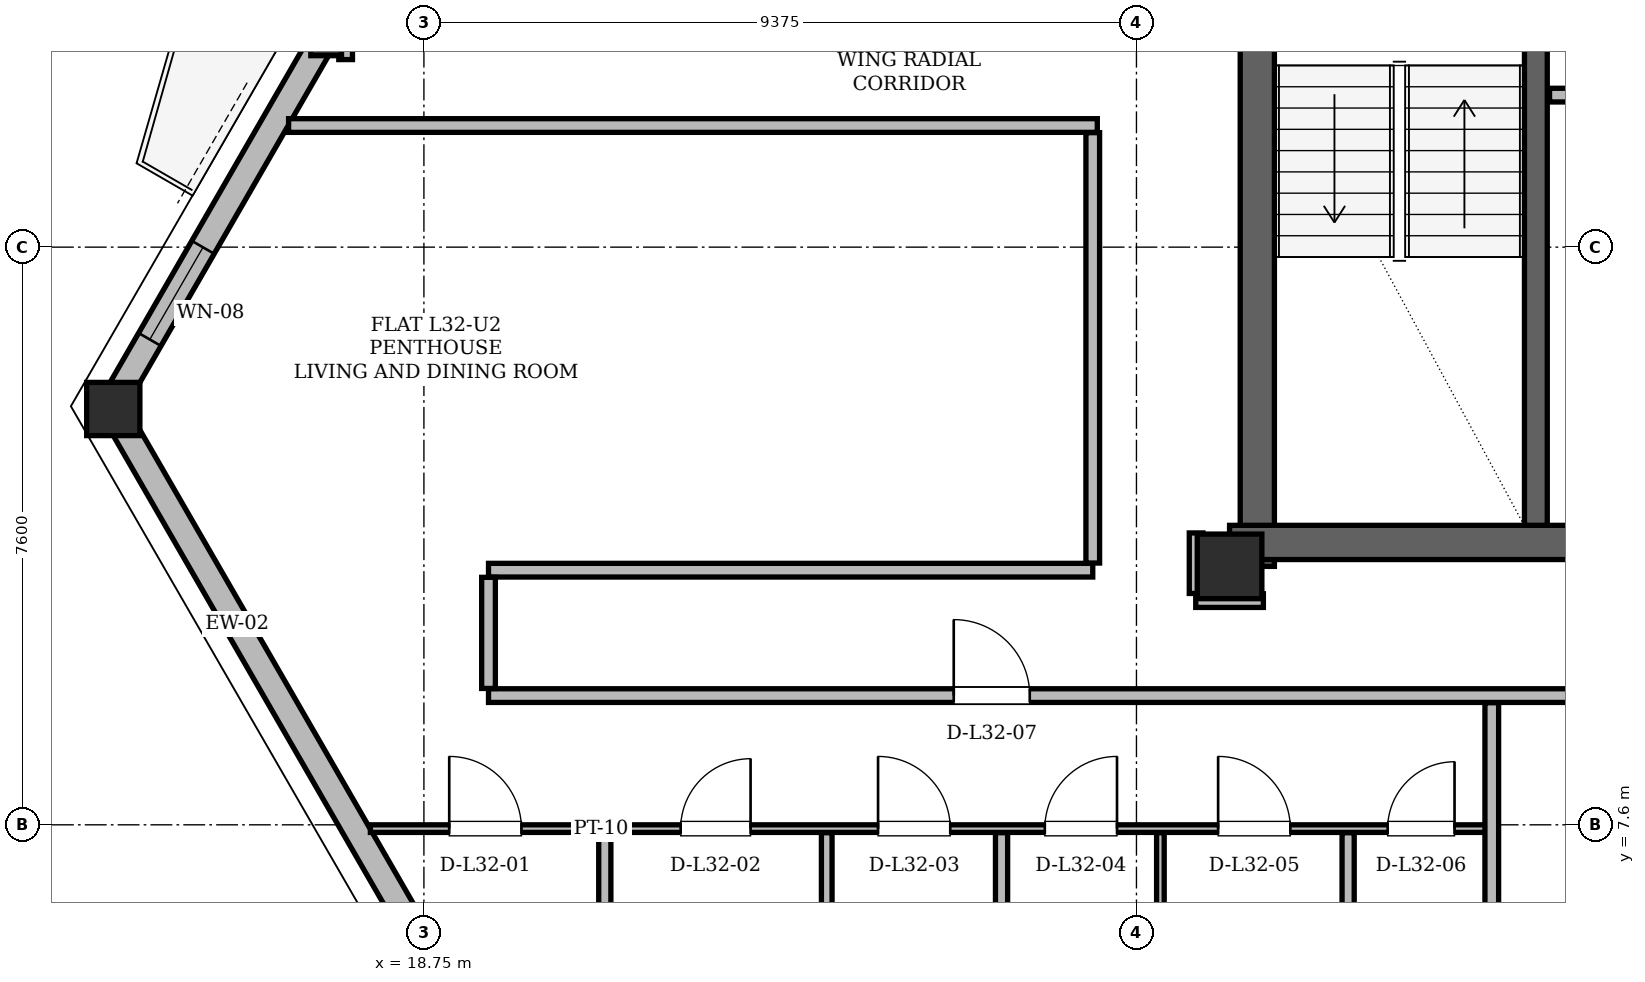
"""IFC4 building model, lengths in metres.
Left out: names, types, materials, properties, quantities, classifications, styles, units other than length and angle.
Written with IfcOpenShell. Run it as: python <this file> out.ifc"""

import sys

from ifc_helpers import new_model, si_unit, direction, frame, frame_2d, origin, origin_2d, place, context, subcontext, project, spatial, rectangle, hollow_rectangle, i_section, extrude, element, fill, save


model = new_model("IFC4")
c1 = context("Model", 3, precision=1e-05, world=origin(), true_north=direction((0.0, 1.0)))
c2 = subcontext(c1, "Body", "Model", "MODEL_VIEW")
j1 = project(units=[si_unit("LENGTHUNIT", "METRE"), si_unit("PLANEANGLEUNIT", "RADIAN")], contexts=[c1])
p1 = place(None, origin())
s1 = spatial("IfcSite", under=j1, at=p1, CompositionType="ELEMENT")
p2 = place(p1, origin())
s2 = spatial("IfcBuilding", under=s1, at=p2, CompositionType="ELEMENT")
p3 = place(p2, frame((0.0, 0.0, 123.0)))
s3 = spatial("IfcBuildingStorey", under=s2, at=p3, CompositionType="ELEMENT", Elevation=123.0)
p4 = place(p3, frame((29.35, 11.0, 0.0), z_axis=(0.0, 0.0, 1.0), x_axis=(1.0, 0.0, 0.0)))
e1 = element("IfcColumn", 1, at=p4, inside=s3, PredefinedType="COLUMN", context=c2, shape_type="SweptSolid", body=[
    extrude(hollow_rectangle(XDim=0.85, YDim=0.85, WallThickness=0.07, at=origin_2d()), origin(), (0.0, 0.0, 1.0), 3.6),
])
p5 = place(p3, frame((14.636, 13.107, 0.004), z_axis=(0.014748241412, -0.020253345349, 0.999686096421), x_axis=(0.808384021956, 0.588655479076, 0.0)))
e2 = element("IfcColumn", 2, at=p5, inside=s3, PredefinedType="COLUMN", context=c2, shape_type="SweptSolid", body=[
    extrude(hollow_rectangle(XDim=0.7, YDim=0.7, WallThickness=0.055, at=origin_2d()), origin(), (0.0, 0.0, 1.0), 3.592),
])
p6 = place(p3, frame((17.435, 17.953, 0.004), z_axis=(0.016379828323, -0.017467285805, 0.999713256464), x_axis=(0.729448684879, 0.684035537182, 0.0)))
e3 = element("IfcColumn", 3, at=p6, inside=s3, PredefinedType="COLUMN", context=c2, shape_type="SweptSolid", body=[
    extrude(i_section(OverallWidth=0.404, OverallDepth=0.406, WebThickness=0.027, FlangeThickness=0.044, at=origin_2d()), origin(), (0.0, 0.0, 1.0), 3.592),
])
p7 = place(p3, frame((29.715, 11.0, 0.0), z_axis=(0.0, 0.0, 1.0), x_axis=(0.0, 1.0, 0.0)))
e4 = element("IfcWall", 4, at=p7, inside=s3, PredefinedType="SHEAR", context=c2, shape_type="SweptSolid", body=[
    extrude(rectangle(XDim=13.3, YDim=0.45, at=frame_2d((6.65, 0.0))), origin(), (0.0, 0.0, 1.0), 3.36),
])
p8 = place(p3, frame((29.35, 11.315, 0.0), z_axis=(0.0, 0.0, 1.0), x_axis=(1.0, 0.0, 0.0)))
e5 = element("IfcWall", 5, at=p8, inside=s3, PredefinedType="SHEAR", context=c2, shape_type="SweptSolid", body=[
    extrude(rectangle(XDim=7.1, YDim=0.45, at=frame_2d((3.55, 0.0))), origin(), (0.0, 0.0, 1.0), 3.36),
])
p9 = place(p3, frame((33.38, 11.54, 0.0), z_axis=(0.0, 0.0, 1.0), x_axis=(0.0, 1.0, 0.0)))
e6 = element("IfcWall", 6, at=p9, inside=s3, PredefinedType="SHEAR", context=c2, shape_type="SweptSolid", body=[
    extrude(rectangle(XDim=7.62, YDim=0.3, at=frame_2d((3.81, 0.0))), origin(), (0.0, 0.0, 1.0), 3.36),
])
p10 = place(p3, frame((14.636, 13.107, 0.0), z_axis=(0.0, 0.0, 1.0), x_axis=(0.500010095722, -0.866019574938, 0.0)))
e7 = element("IfcWall", 7, at=p10, inside=s3, PredefinedType="SOLIDWALL", context=c2, shape_type="SweptSolid", body=[
    extrude(rectangle(XDim=10.751, YDim=0.34, at=frame_2d((5.375, 0.0))), origin(), (0.0, 0.0, 1.0), 2.578),
])
p11 = place(p3, frame((32.124, 43.397, 0.0), z_axis=(0.0, 0.0, 1.0), x_axis=(-0.499996370967, -0.866027498997, 0.0)))
e8 = element("IfcWall", 8, at=p11, inside=s3, PredefinedType="SOLIDWALL", context=c2, shape_type="SweptSolid", body=[
    extrude(rectangle(XDim=34.976, YDim=0.34, at=frame_2d((17.488, 0.0))), origin(), (0.0, 0.0, 1.0), 2.578),
])
p12 = place(p11, frame((8.034, 0.0, 0.0)))
e9 = element("IfcOpeningElement", 9, at=p12, cuts=e8, PredefinedType="OPENING", context=c2, shape_type="SweptSolid", body=[
    extrude(rectangle(XDim=1.5, YDim=2.2, at=frame_2d((0.75, 1.1))), frame((0.0, 0.17, 0.0), z_axis=(0.0, -1.0, 0.0), x_axis=(1.0, 0.0, 0.0)), (0.0, 0.0, 1.0), 0.34),
])
p13 = place(p11, frame((26.896, 0.0, 0.0)))
e10 = element("IfcOpeningElement", 10, at=p13, cuts=e8, PredefinedType="OPENING", context=c2, shape_type="SweptSolid", body=[
    extrude(rectangle(XDim=1.5, YDim=2.2, at=frame_2d((0.75, 1.1))), frame((0.0, 0.17, 0.0), z_axis=(0.0, -1.0, 0.0), x_axis=(1.0, 0.0, 0.0)), (0.0, 0.0, 1.0), 0.34),
])
p14 = place(p11, frame((32.562, 0.0, 0.85)))
e11 = element("IfcOpeningElement", 11, at=p14, cuts=e8, PredefinedType="OPENING", context=c2, shape_type="SweptSolid", body=[
    extrude(rectangle(XDim=1.4, YDim=1.6, at=frame_2d((0.7, 0.8))), frame((0.0, 0.17, 0.0), z_axis=(0.0, -1.0, 0.0), x_axis=(1.0, 0.0, 0.0)), (0.0, 0.0, 1.0), 0.34),
])
p15 = place(p11, frame((22.614, 0.0, 0.85)))
e12 = element("IfcOpeningElement", 12, at=p15, cuts=e8, PredefinedType="OPENING", context=c2, shape_type="SweptSolid", body=[
    extrude(rectangle(XDim=1.2, YDim=1.48, at=frame_2d((0.6, 0.74))), frame((0.0, 0.17, 0.0), z_axis=(0.0, -1.0, 0.0), x_axis=(1.0, 0.0, 0.0)), (0.0, 0.0, 1.0), 0.34),
])
p16 = place(p11, frame((2.415, 0.0, 0.85)))
e13 = element("IfcOpeningElement", 13, at=p16, cuts=e8, PredefinedType="OPENING", context=c2, shape_type="SweptSolid", body=[
    extrude(rectangle(XDim=1.4, YDim=1.6, at=frame_2d((0.7, 0.8))), frame((0.0, 0.17, 0.0), z_axis=(0.0, -1.0, 0.0), x_axis=(1.0, 0.0, 0.0)), (0.0, 0.0, 1.0), 0.34),
])
p17 = place(p11, frame((13.492, 0.0, 0.85)))
e14 = element("IfcOpeningElement", 14, at=p17, cuts=e8, PredefinedType="OPENING", context=c2, shape_type="SweptSolid", body=[
    extrude(rectangle(XDim=2.5, YDim=1.618, at=frame_2d((1.25, 0.809))), frame((0.0, 0.17, 0.0), z_axis=(0.0, -1.0, 0.0), x_axis=(1.0, 0.0, 0.0)), (0.0, 0.0, 1.0), 0.34),
])
p18 = place(p11, frame((18.281, 0.0, 0.85)))
e15 = element("IfcOpeningElement", 15, at=p18, cuts=e8, PredefinedType="OPENING", context=c2, shape_type="SweptSolid", body=[
    extrude(rectangle(XDim=1.2, YDim=1.48, at=frame_2d((0.6, 0.74))), frame((0.0, 0.17, 0.0), z_axis=(0.0, -1.0, 0.0), x_axis=(1.0, 0.0, 0.0)), (0.0, 0.0, 1.0), 0.34),
])
p19 = place(p11, frame((20.476, 0.0, 0.85)))
e16 = element("IfcOpeningElement", 16, at=p19, cuts=e8, PredefinedType="OPENING", context=c2, shape_type="SweptSolid", body=[
    extrude(rectangle(XDim=1.2, YDim=1.48, at=frame_2d((0.6, 0.74))), frame((0.0, 0.17, 0.0), z_axis=(0.0, -1.0, 0.0), x_axis=(1.0, 0.0, 0.0)), (0.0, 0.0, 1.0), 0.34),
])
p20 = place(p3, frame((33.56, 17.2, 0.0), z_axis=(0.0, 0.0, 1.0), x_axis=(1.0, 0.0, 0.0)))
e17 = element("IfcWall", 17, at=p20, inside=s3, PredefinedType="PARTITIONING", context=c2, shape_type="SweptSolid", body=[
    extrude(rectangle(XDim=2.66, YDim=0.18, at=frame_2d((1.33, 0.0))), origin(), (0.0, 0.0, 1.0), 3.36),
])
p21 = place(p3, frame((18.046, 7.55, 0.0), z_axis=(0.0, 0.0, 1.0), x_axis=(1.0, 0.0, 0.0)))
e18 = element("IfcWall", 18, at=p21, inside=s3, PredefinedType="PARTITIONING", context=c2, shape_type="SweptSolid", body=[
    extrude(rectangle(XDim=14.804, YDim=0.1, at=frame_2d((7.402, 0.0))), origin(), (0.0, 0.0, 1.0), 2.814),
])
p22 = place(p21, frame((1.037, 0.0, 0.0)))
e19 = element("IfcOpeningElement", 19, at=p22, cuts=e18, PredefinedType="OPENING", context=c2, shape_type="SweptSolid", body=[
    extrude(rectangle(XDim=0.95, YDim=2.1, at=frame_2d((0.475, 1.05))), frame((0.0, 0.05, 0.0), z_axis=(0.0, -1.0, 0.0), x_axis=(1.0, 0.0, 0.0)), (0.0, 0.0, 1.0), 0.1),
])
p23 = place(p21, frame((4.082, 0.0, 0.0)))
e20 = element("IfcOpeningElement", 20, at=p23, cuts=e18, PredefinedType="OPENING", context=c2, shape_type="SweptSolid", body=[
    extrude(rectangle(XDim=0.92, YDim=2.12, at=frame_2d((0.46, 1.06))), frame((0.0, 0.05, 0.0), z_axis=(0.0, -1.0, 0.0), x_axis=(1.0, 0.0, 0.0)), (0.0, 0.0, 1.0), 0.1),
])
p24 = place(p21, frame((6.679, 0.0, 0.0)))
e21 = element("IfcOpeningElement", 21, at=p24, cuts=e18, PredefinedType="OPENING", context=c2, shape_type="SweptSolid", body=[
    extrude(rectangle(XDim=0.95, YDim=2.1, at=frame_2d((0.475, 1.05))), frame((0.0, 0.05, 0.0), z_axis=(0.0, -1.0, 0.0), x_axis=(1.0, 0.0, 0.0)), (0.0, 0.0, 1.0), 0.1),
])
p25 = place(p21, frame((8.873, 0.0, 0.0)))
e22 = element("IfcOpeningElement", 22, at=p25, cuts=e18, PredefinedType="OPENING", context=c2, shape_type="SweptSolid", body=[
    extrude(rectangle(XDim=0.95, YDim=2.1, at=frame_2d((0.475, 1.05))), frame((0.0, 0.05, 0.0), z_axis=(0.0, -1.0, 0.0), x_axis=(1.0, 0.0, 0.0)), (0.0, 0.0, 1.0), 0.1),
])
p26 = place(p21, frame((11.154, 0.0, 0.0)))
e23 = element("IfcOpeningElement", 23, at=p26, cuts=e18, PredefinedType="OPENING", context=c2, shape_type="SweptSolid", body=[
    extrude(rectangle(XDim=0.95, YDim=2.1, at=frame_2d((0.475, 1.05))), frame((0.0, 0.05, 0.0), z_axis=(0.0, -1.0, 0.0), x_axis=(1.0, 0.0, 0.0)), (0.0, 0.0, 1.0), 0.1),
])
p27 = place(p21, frame((13.384, 0.0, 0.0)))
e24 = element("IfcOpeningElement", 24, at=p27, cuts=e18, PredefinedType="OPENING", context=c2, shape_type="SweptSolid", body=[
    extrude(rectangle(XDim=0.88, YDim=2.08, at=frame_2d((0.44, 1.04))), frame((0.0, 0.05, 0.0), z_axis=(0.0, -1.0, 0.0), x_axis=(1.0, 0.0, 0.0)), (0.0, 0.0, 1.0), 0.1),
])
p28 = place(p3, frame((19.6, 9.3, 0.0), z_axis=(0.0, 0.0, 1.0), x_axis=(1.0, 0.0, 0.0)))
e25 = element("IfcWall", 25, at=p28, inside=s3, PredefinedType="PARTITIONING", context=c2, shape_type="SweptSolid", body=[
    extrude(rectangle(XDim=30.4, YDim=0.18, at=frame_2d((15.2, 0.0))), origin(), (0.0, 0.0, 1.0), 2.814),
])
p29 = place(p28, frame((6.121, 0.0, 0.0)))
e26 = element("IfcOpeningElement", 26, at=p29, cuts=e25, PredefinedType="OPENING", context=c2, shape_type="SweptSolid", body=[
    extrude(rectangle(XDim=1.0, YDim=2.18, at=frame_2d((0.5, 1.09))), frame((0.0, 0.09, 0.0), z_axis=(0.0, -1.0, 0.0), x_axis=(1.0, 0.0, 0.0)), (0.0, 0.0, 1.0), 0.18),
])
p30 = place(p28, frame((15.05, 0.0, 0.0)))
e27 = element("IfcOpeningElement", 27, at=p30, cuts=e25, PredefinedType="OPENING", context=c2, shape_type="SweptSolid", body=[
    extrude(rectangle(XDim=1.3, YDim=2.2, at=frame_2d((0.65, 1.1))), frame((0.0, 0.09, 0.0), z_axis=(0.0, -1.0, 0.0), x_axis=(1.0, 0.0, 0.0)), (0.0, 0.0, 1.0), 0.18),
])
p31 = place(p28, frame((24.633, 0.0, 0.0)))
e28 = element("IfcOpeningElement", 28, at=p31, cuts=e25, PredefinedType="OPENING", context=c2, shape_type="SweptSolid", body=[
    extrude(rectangle(XDim=1.0, YDim=2.18, at=frame_2d((0.5, 1.09))), frame((0.0, 0.09, 0.0), z_axis=(0.0, -1.0, 0.0), x_axis=(1.0, 0.0, 0.0)), (0.0, 0.0, 1.0), 0.18),
])
p32 = place(p3, frame((28.905, 10.55, 0.0), z_axis=(0.0, 0.0, 1.0), x_axis=(1.0, 0.0, 0.0)))
e29 = element("IfcWall", 29, at=p32, inside=s3, PredefinedType="PARTITIONING", context=c2, shape_type="SweptSolid", body=[
    extrude(rectangle(XDim=0.89, YDim=0.18, at=frame_2d((0.445, 0.0))), origin(), (0.0, 0.0, 1.0), 3.36),
])
p33 = place(p3, frame((19.6, 10.95, 0.0), z_axis=(0.0, 0.0, 1.0), x_axis=(1.0, 0.0, 0.0)))
e30 = element("IfcWall", 30, at=p33, inside=s3, PredefinedType="PARTITIONING", context=c2, shape_type="SweptSolid", body=[
    extrude(rectangle(XDim=7.95, YDim=0.18, at=frame_2d((3.975, 0.0))), origin(), (0.0, 0.0, 1.0), 3.36),
])
p34 = place(p3, frame((16.969, 16.8, 0.0), z_axis=(0.0, 0.0, 1.0), x_axis=(1.0, 0.0, 0.0)))
e31 = element("IfcWall", 31, at=p34, inside=s3, PredefinedType="PARTITIONING", context=c2, shape_type="SweptSolid", body=[
    extrude(rectangle(XDim=10.641, YDim=0.18, at=frame_2d((5.32, 0.0))), origin(), (0.0, 0.0, 1.0), 3.36),
])
p35 = place(p3, frame((17.72, 17.667, 0.0), z_axis=(0.0, 0.0, 1.0), x_axis=(0.0, 1.0, 0.0)))
e32 = element("IfcWall", 32, at=p35, inside=s3, PredefinedType="PARTITIONING", context=c2, shape_type="SweptSolid", body=[
    extrude(rectangle(XDim=0.432, YDim=0.18, at=frame_2d((0.216, 0.0))), origin(), (0.0, 0.0, 1.0), 2.578),
])
p36 = place(p3, frame((19.6, 9.394, 0.0), z_axis=(0.0, 0.0, 1.0), x_axis=(0.0, 1.0, 0.0)))
e33 = element("IfcWall", 33, at=p36, inside=s3, PredefinedType="PARTITIONING", context=c2, shape_type="SweptSolid", body=[
    extrude(rectangle(XDim=1.462, YDim=0.18, at=frame_2d((0.731, 0.0))), origin(), (0.0, 0.0, 1.0), 3.36),
])
p37 = place(p3, frame((21.13, 3.97, 0.0), z_axis=(0.0, 0.0, 1.0), x_axis=(0.0, 1.0, 0.0)))
e34 = element("IfcWall", 34, at=p37, inside=s3, PredefinedType="PARTITIONING", context=c2, shape_type="SweptSolid", body=[
    extrude(rectangle(XDim=3.526, YDim=0.16, at=frame_2d((1.763, 0.0))), origin(), (0.0, 0.0, 1.0), 2.814),
])
p38 = place(p3, frame((24.05, 3.97, 0.0), z_axis=(0.0, 0.0, 1.0), x_axis=(0.0, 1.0, 0.0)))
e35 = element("IfcWall", 35, at=p38, inside=s3, PredefinedType="PARTITIONING", context=c2, shape_type="SweptSolid", body=[
    extrude(rectangle(XDim=3.526, YDim=0.14, at=frame_2d((1.763, 0.0))), origin(), (0.0, 0.0, 1.0), 2.814),
])
p39 = place(p3, frame((26.35, 3.97, 0.0), z_axis=(0.0, 0.0, 1.0), x_axis=(0.0, 1.0, 0.0)))
e36 = element("IfcWall", 36, at=p39, inside=s3, PredefinedType="PARTITIONING", context=c2, shape_type="SweptSolid", body=[
    extrude(rectangle(XDim=3.526, YDim=0.16, at=frame_2d((1.763, 0.0))), origin(), (0.0, 0.0, 1.0), 2.946),
])
p40 = place(p3, frame((27.55, 11.044, 0.0), z_axis=(0.0, 0.0, 1.0), x_axis=(0.0, 1.0, 0.0)))
e37 = element("IfcWall", 37, at=p40, inside=s3, PredefinedType="PARTITIONING", context=c2, shape_type="SweptSolid", body=[
    extrude(rectangle(XDim=5.662, YDim=0.18, at=frame_2d((2.831, 0.0))), origin(), (0.0, 0.0, 1.0), 2.814),
])
p41 = place(p3, frame((28.44, 3.97, 0.0), z_axis=(0.0, 0.0, 1.0), x_axis=(0.0, 1.0, 0.0)))
e38 = element("IfcWall", 38, at=p41, inside=s3, PredefinedType="PARTITIONING", context=c2, shape_type="SweptSolid", body=[
    extrude(rectangle(XDim=3.526, YDim=0.1, at=frame_2d((1.763, 0.0))), origin(), (0.0, 0.0, 1.0), 3.36),
])
p42 = place(p3, frame((28.91, 10.644, 0.0), z_axis=(0.0, 0.0, 1.0), x_axis=(0.0, 1.0, 0.0)))
e39 = element("IfcWall", 39, at=p42, inside=s3, PredefinedType="PARTITIONING", context=c2, shape_type="SweptSolid", body=[
    extrude(rectangle(XDim=0.796, YDim=0.18, at=frame_2d((0.398, 0.0))), origin(), (0.0, 0.0, 1.0), 2.814),
])
p43 = place(p3, frame((30.91, 3.97, 0.0), z_axis=(0.0, 0.0, 1.0), x_axis=(0.0, 1.0, 0.0)))
e40 = element("IfcWall", 40, at=p43, inside=s3, PredefinedType="PARTITIONING", context=c2, shape_type="SweptSolid", body=[
    extrude(rectangle(XDim=3.526, YDim=0.16, at=frame_2d((1.763, 0.0))), origin(), (0.0, 0.0, 1.0), 2.946),
])
p44 = place(p3, frame((32.8, 5.094, 0.0), z_axis=(0.0, 0.0, 1.0), x_axis=(0.0, 1.0, 0.0)))
e41 = element("IfcWall", 41, at=p44, inside=s3, PredefinedType="PARTITIONING", context=c2, shape_type="SweptSolid", body=[
    extrude(rectangle(XDim=4.112, YDim=0.18, at=frame_2d((2.056, 0.0))), origin(), (0.0, 0.0, 1.0), 2.946),
])
p45 = place(p14, origin())
e42 = element("IfcWindow", 42, at=p45, inside=s3, PartitioningType="SINGLE_PANEL", PredefinedType="WINDOW", context=c2, shape_type="SweptSolid", body=[
    extrude(rectangle(XDim=1.4, YDim=1.6, at=frame_2d((0.7, 0.8))), frame((0.0, 0.03, 0.0), z_axis=(0.0, -1.0, 0.0), x_axis=(1.0, 0.0, 0.0)), (0.0, 0.0, 1.0), 0.06),
])
fill(e11, e42)
p46 = place(p22, origin())
e43 = element("IfcDoor", 43, at=p46, inside=s3, OperationType="SINGLE_SWING_LEFT", PredefinedType="DOOR", context=c2, shape_type="SweptSolid", body=[
    extrude(rectangle(XDim=0.95, YDim=2.1, at=frame_2d((0.475, 1.05))), frame((0.0, 0.025, 0.0), z_axis=(0.0, -1.0, 0.0), x_axis=(1.0, 0.0, 0.0)), (0.0, 0.0, 1.0), 0.05),
])
fill(e19, e43)
p47 = place(p23, origin())
e44 = element("IfcDoor", 44, at=p47, inside=s3, OperationType="SINGLE_SWING_RIGHT", PredefinedType="DOOR", context=c2, shape_type="SweptSolid", body=[
    extrude(rectangle(XDim=0.92, YDim=2.12, at=frame_2d((0.46, 1.06))), frame((0.0, 0.025, 0.0), z_axis=(0.0, -1.0, 0.0), x_axis=(1.0, 0.0, 0.0)), (0.0, 0.0, 1.0), 0.05),
])
fill(e20, e44)
p48 = place(p24, origin())
e45 = element("IfcDoor", 45, at=p48, inside=s3, OperationType="SINGLE_SWING_LEFT", PredefinedType="DOOR", context=c2, shape_type="SweptSolid", body=[
    extrude(rectangle(XDim=0.95, YDim=2.1, at=frame_2d((0.475, 1.05))), frame((0.0, 0.025, 0.0), z_axis=(0.0, -1.0, 0.0), x_axis=(1.0, 0.0, 0.0)), (0.0, 0.0, 1.0), 0.05),
])
fill(e21, e45)
p49 = place(p25, origin())
e46 = element("IfcDoor", 46, at=p49, inside=s3, OperationType="SINGLE_SWING_RIGHT", PredefinedType="DOOR", context=c2, shape_type="SweptSolid", body=[
    extrude(rectangle(XDim=0.95, YDim=2.1, at=frame_2d((0.475, 1.05))), frame((0.0, 0.025, 0.0), z_axis=(0.0, -1.0, 0.0), x_axis=(1.0, 0.0, 0.0)), (0.0, 0.0, 1.0), 0.05),
])
fill(e22, e46)
p50 = place(p26, origin())
e47 = element("IfcDoor", 47, at=p50, inside=s3, OperationType="SINGLE_SWING_LEFT", PredefinedType="DOOR", context=c2, shape_type="SweptSolid", body=[
    extrude(rectangle(XDim=0.95, YDim=2.1, at=frame_2d((0.475, 1.05))), frame((0.0, 0.025, 0.0), z_axis=(0.0, -1.0, 0.0), x_axis=(1.0, 0.0, 0.0)), (0.0, 0.0, 1.0), 0.05),
])
fill(e23, e47)
p51 = place(p27, origin())
e48 = element("IfcDoor", 48, at=p51, inside=s3, OperationType="SINGLE_SWING_RIGHT", PredefinedType="DOOR", context=c2, shape_type="SweptSolid", body=[
    extrude(rectangle(XDim=0.88, YDim=2.08, at=frame_2d((0.44, 1.04))), frame((0.0, 0.025, 0.0), z_axis=(0.0, -1.0, 0.0), x_axis=(1.0, 0.0, 0.0)), (0.0, 0.0, 1.0), 0.05),
])
fill(e24, e48)
p52 = place(p29, origin())
e49 = element("IfcDoor", 49, at=p52, inside=s3, OperationType="SINGLE_SWING_LEFT", PredefinedType="DOOR", context=c2, shape_type="SweptSolid", body=[
    extrude(rectangle(XDim=1.0, YDim=2.18, at=frame_2d((0.5, 1.09))), frame((0.0, 0.025, 0.0), z_axis=(0.0, -1.0, 0.0), x_axis=(1.0, 0.0, 0.0)), (0.0, 0.0, 1.0), 0.05),
])
fill(e26, e49)
save(model, sys.argv[1])
